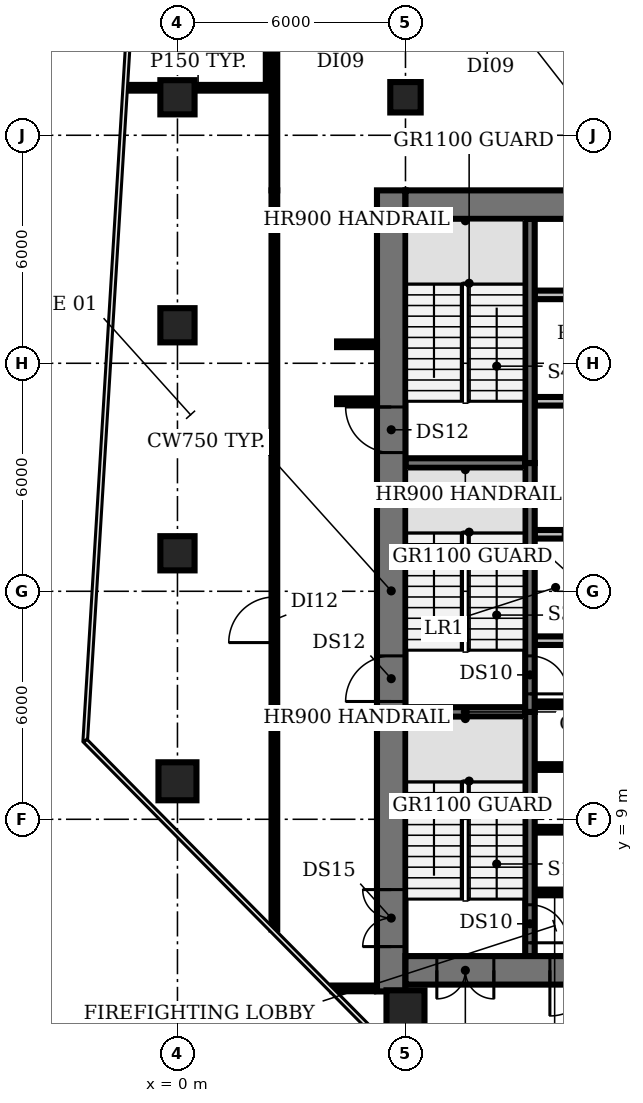
"""IFC4 building model, lengths in metres.
Left out: names, types, materials, properties, quantities, classifications, styles, units other than length and angle.
Written with IfcOpenShell. Run it as: python <this file> out.ifc"""

import sys

from ifc_helpers import new_model, si_unit, direction, frame, frame_2d, origin, origin_2d, place, context, subcontext, project, spatial, rectangle, circle, extrude, element, fill, save


model = new_model("IFC4")
c1 = context("Model", 3, precision=1e-05, world=origin(), true_north=direction((0.0, 1.0)))
c2 = subcontext(c1, "Body", "Model", "MODEL_VIEW")
j1 = project(units=[si_unit("LENGTHUNIT", "METRE"), si_unit("PLANEANGLEUNIT", "RADIAN")], contexts=[c1])
p1 = place(None, origin())
s1 = spatial("IfcSite", under=j1, at=p1, CompositionType="ELEMENT")
p2 = place(p1, origin())
s2 = spatial("IfcBuilding", under=s1, at=p2, CompositionType="ELEMENT")
p3 = place(p2, frame((0.0, 0.0, 125.6)))
s3 = spatial("IfcBuildingStorey", under=s2, at=p3, CompositionType="ELEMENT", Elevation=125.6)
p4 = place(p3, frame((0.0, 10.0, 0.0), z_axis=(0.0, 0.0, 1.0), x_axis=(1.0, 0.0, 0.0)))
e1 = element("IfcColumn", 1, at=p4, inside=s3, PredefinedType="COLUMN", context=c2, shape_type="SweptSolid", body=[
    extrude(circle(Radius=0.5, at=origin_2d()), origin(), (0.0, 0.0, 1.0), 3.85),
])
for number, where, z_axis, x_axis in (
    (2, (0.0, 16.0, 0.0), (0.0, 0.0, 1.0), (1.0, 0.0, 0.0)),
    (3, (0.0, 22.0, 0.0), (0.0, 0.0, 1.0), (1.0, 0.0, 0.0)),
    (4, (0.0, 28.0, 0.0), (0.0, 0.0, 1.0), (1.0, 0.0, 0.0)),
):
    element("IfcColumn", number, at=place(p3, frame(where, z_axis=z_axis, x_axis=x_axis)), inside=s3, PredefinedType="COLUMN", context=c2, shape_type="SweptSolid", body=[
        extrude(rectangle(XDim=0.9, YDim=0.9, at=origin_2d()), origin(), (0.0, 0.0, 1.0), 3.85),
    ])
p5 = place(p3, frame((6.0, 4.0, 0.0), z_axis=(0.0, 0.0, 1.0), x_axis=(1.0, 0.0, 0.0)))
e5 = element("IfcColumn", 5, at=p5, inside=s3, PredefinedType="COLUMN", context=c2, shape_type="SweptSolid", body=[
    extrude(circle(Radius=0.5, at=origin_2d()), origin(), (0.0, 0.0, 1.0), 3.85),
])
p6 = place(p3, frame((6.0, 28.0, 0.0), z_axis=(0.0, 0.0, 1.0), x_axis=(1.0, 0.0, 0.0)))
e6 = element("IfcColumn", 6, at=p6, inside=s3, PredefinedType="COLUMN", context=c2, shape_type="SweptSolid", body=[
    extrude(rectangle(XDim=0.8, YDim=0.8, at=origin_2d()), origin(), (0.0, 0.0, 1.0), 3.85),
])
for number, where, z_axis, x_axis in (
    (7, (9.4, 7.075, 0.0), (0.0, 0.0, 1.0), (1.0, 0.0, 0.0)),
    (8, (9.4, 8.725, 0.0), (0.0, 0.0, 1.0), (1.0, 0.0, 0.0)),
    (9, (9.4, 10.375, 0.0), (0.0, 0.0, 1.0), (1.0, 0.0, 0.0)),
):
    element("IfcWall", number, at=place(p3, frame(where, z_axis=z_axis, x_axis=x_axis)), inside=s3, PredefinedType="SHEAR", context=c2, shape_type="SweptSolid", body=[
        extrude(rectangle(XDim=1.05, YDim=0.15, at=frame_2d((0.525, 0.0))), origin(), (0.0, 0.0, 1.0), 3.85),
    ])
p7 = place(p3, frame((6.0, 11.825, 0.0), z_axis=(0.0, 0.0, 1.0), x_axis=(1.0, 0.0, 0.0)))
e10 = element("IfcWall", 10, at=p7, inside=s3, PredefinedType="SHEAR", context=c2, shape_type="SweptSolid", body=[
    extrude(rectangle(XDim=3.15, YDim=0.25, at=frame_2d((1.575, 0.0))), origin(), (0.0, 0.0, 1.0), 3.85),
])
p8 = place(p3, frame((9.4, 12.025, 0.0), z_axis=(0.0, 0.0, 1.0), x_axis=(1.0, 0.0, 0.0)))
e11 = element("IfcWall", 11, at=p8, inside=s3, PredefinedType="SHEAR", context=c2, shape_type="SweptSolid", body=[
    extrude(rectangle(XDim=1.05, YDim=0.15, at=frame_2d((0.525, 0.0))), origin(), (0.0, 0.0, 1.0), 3.85),
])
p9 = place(p3, frame((9.4, 13.7, 0.0), z_axis=(0.0, 0.0, 1.0), x_axis=(1.0, 0.0, 0.0)))
e12 = element("IfcWall", 12, at=p9, inside=s3, PredefinedType="PARTITIONING", context=c2, shape_type="SweptSolid", body=[
    extrude(rectangle(XDim=4.0, YDim=0.225, at=frame_2d((2.0, 0.0))), origin(), (0.0, 0.0, 1.0), 3.85),
])
p10 = place(p3, frame((9.4, 16.5, 0.0), z_axis=(0.0, 0.0, 1.0), x_axis=(1.0, 0.0, 0.0)))
e13 = element("IfcWall", 13, at=p10, inside=s3, PredefinedType="PARTITIONING", context=c2, shape_type="SweptSolid", body=[
    extrude(rectangle(XDim=14.6, YDim=0.225, at=frame_2d((7.3, 0.0))), origin(), (0.0, 0.0, 1.0), 3.85),
])
p11 = place(p10, frame((0.75, 0.0, 0.0)))
e14 = element("IfcOpeningElement", 14, at=p11, cuts=e13, PredefinedType="OPENING", context=c2, shape_type="SweptSolid", body=[
    extrude(rectangle(XDim=1.1, YDim=2.1, at=frame_2d((0.55, 1.05))), frame((0.0, 0.123, 0.0), z_axis=(0.0, -1.0, 0.0), x_axis=(1.0, 0.0, 0.0)), (0.0, 0.0, 1.0), 0.245),
])
p12 = place(p10, frame((3.55, 0.0, 0.0)))
e15 = element("IfcOpeningElement", 15, at=p12, cuts=e13, PredefinedType="OPENING", context=c2, shape_type="SweptSolid", body=[
    extrude(rectangle(XDim=1.1, YDim=2.1, at=frame_2d((0.55, 1.05))), frame((0.0, 0.123, 0.0), z_axis=(0.0, -1.0, 0.0), x_axis=(1.0, 0.0, 0.0)), (0.0, 0.0, 1.0), 0.245),
])
p13 = place(p10, frame((6.35, 0.0, 0.0)))
e16 = element("IfcOpeningElement", 16, at=p13, cuts=e13, PredefinedType="OPENING", context=c2, shape_type="SweptSolid", body=[
    extrude(rectangle(XDim=1.1, YDim=2.1, at=frame_2d((0.55, 1.05))), frame((0.0, 0.123, 0.0), z_axis=(0.0, -1.0, 0.0), x_axis=(1.0, 0.0, 0.0)), (0.0, 0.0, 1.0), 0.245),
])
p14 = place(p10, frame((9.15, 0.0, 0.0)))
e17 = element("IfcOpeningElement", 17, at=p14, cuts=e13, PredefinedType="OPENING", context=c2, shape_type="SweptSolid", body=[
    extrude(rectangle(XDim=1.1, YDim=2.1, at=frame_2d((0.55, 1.05))), frame((0.0, 0.123, 0.0), z_axis=(0.0, -1.0, 0.0), x_axis=(1.0, 0.0, 0.0)), (0.0, 0.0, 1.0), 0.245),
])
p15 = place(p10, frame((12.4, 0.0, 0.0)))
e18 = element("IfcOpeningElement", 18, at=p15, cuts=e13, PredefinedType="OPENING", context=c2, shape_type="SweptSolid", body=[
    extrude(rectangle(XDim=1.0, YDim=2.1, at=frame_2d((0.5, 1.05))), frame((0.0, 0.123, 0.0), z_axis=(0.0, -1.0, 0.0), x_axis=(1.0, 0.0, 0.0)), (0.0, 0.0, 1.0), 0.245),
])
p16 = place(p3, frame((6.0, 18.375, 0.0), z_axis=(0.0, 0.0, 1.0), x_axis=(1.0, 0.0, 0.0)))
e19 = element("IfcWall", 19, at=p16, inside=s3, PredefinedType="SHEAR", context=c2, shape_type="SweptSolid", body=[
    extrude(rectangle(XDim=3.15, YDim=0.25, at=frame_2d((1.575, 0.0))), origin(), (0.0, 0.0, 1.0), 3.85),
])
p17 = place(p3, frame((24.0, 20.0, 0.0), z_axis=(0.0, 0.0, 1.0), x_axis=(-1.0, 0.0, 0.0)))
e20 = element("IfcWall", 20, at=p17, inside=s3, PredefinedType="PARTITIONING", context=c2, shape_type="SweptSolid", body=[
    extrude(rectangle(XDim=14.6, YDim=0.225, at=frame_2d((7.3, 0.0))), origin(), (0.0, 0.0, 1.0), 3.85),
])
p18 = place(p17, frame((12.5, 0.0, 0.0)))
e21 = element("IfcOpeningElement", 21, at=p18, cuts=e20, PredefinedType="OPENING", context=c2, shape_type="SweptSolid", body=[
    extrude(rectangle(XDim=1.0, YDim=2.1, at=frame_2d((0.5, 1.05))), frame((0.0, 0.123, 0.0), z_axis=(0.0, -1.0, 0.0), x_axis=(1.0, 0.0, 0.0)), (0.0, 0.0, 1.0), 0.245),
])
p19 = place(p17, frame((8.825, 0.0, 0.0)))
e22 = element("IfcOpeningElement", 22, at=p19, cuts=e20, PredefinedType="OPENING", context=c2, shape_type="SweptSolid", body=[
    extrude(rectangle(XDim=1.0, YDim=2.1, at=frame_2d((0.5, 1.05))), frame((0.0, 0.123, 0.0), z_axis=(0.0, -1.0, 0.0), x_axis=(1.0, 0.0, 0.0)), (0.0, 0.0, 1.0), 0.245),
])
p20 = place(p17, frame((4.925, 0.0, 0.0)))
e23 = element("IfcOpeningElement", 23, at=p20, cuts=e20, PredefinedType="OPENING", context=c2, shape_type="SweptSolid", body=[
    extrude(rectangle(XDim=1.0, YDim=2.1, at=frame_2d((0.5, 1.05))), frame((0.0, 0.123, 0.0), z_axis=(0.0, -1.0, 0.0), x_axis=(1.0, 0.0, 0.0)), (0.0, 0.0, 1.0), 0.245),
])
p21 = place(p17, frame((1.2, 0.0, 0.0)))
e24 = element("IfcOpeningElement", 24, at=p21, cuts=e20, PredefinedType="OPENING", context=c2, shape_type="SweptSolid", body=[
    extrude(rectangle(XDim=1.0, YDim=2.1, at=frame_2d((0.5, 1.05))), frame((0.0, 0.123, 0.0), z_axis=(0.0, -1.0, 0.0), x_axis=(1.0, 0.0, 0.0)), (0.0, 0.0, 1.0), 0.245),
])
p22 = place(p3, frame((9.4, 22.8, 0.0), z_axis=(0.0, 0.0, 1.0), x_axis=(1.0, 0.0, 0.0)))
e25 = element("IfcWall", 25, at=p22, inside=s3, PredefinedType="PARTITIONING", context=c2, shape_type="SweptSolid", body=[
    extrude(rectangle(XDim=14.6, YDim=0.225, at=frame_2d((7.3, 0.0))), origin(), (0.0, 0.0, 1.0), 3.85),
])
p23 = place(p3, frame((9.275, 11.825, 0.0), z_axis=(0.0, 0.0, 1.0), x_axis=(0.0, -1.0, 0.0)))
e26 = element("IfcWall", 26, at=p23, inside=s3, PredefinedType="SHEAR", context=c2, shape_type="SweptSolid", body=[
    extrude(rectangle(XDim=6.425, YDim=0.25, at=frame_2d((3.212, 0.0))), origin(), (0.0, 0.0, 1.0), 3.85),
])
p24 = place(p23, frame((5.075, 0.0, 0.0)))
e27 = element("IfcOpeningElement", 27, at=p24, cuts=e26, PredefinedType="OPENING", context=c2, shape_type="SweptSolid", body=[
    extrude(rectangle(XDim=1.0, YDim=2.1, at=frame_2d((0.5, 1.05))), frame((0.0, 0.135, 0.0), z_axis=(0.0, -1.0, 0.0), x_axis=(1.0, 0.0, 0.0)), (0.0, 0.0, 1.0), 0.27),
])
p25 = place(p3, frame((9.275, 18.375, 0.0), z_axis=(0.0, 0.0, 1.0), x_axis=(0.0, -1.0, 0.0)))
e28 = element("IfcWall", 28, at=p25, inside=s3, PredefinedType="SHEAR", context=c2, shape_type="SweptSolid", body=[
    extrude(rectangle(XDim=6.55, YDim=0.25, at=frame_2d((3.275, 0.0))), origin(), (0.0, 0.0, 1.0), 3.85),
])
p26 = place(p25, frame((5.075, 0.0, 0.0)))
e29 = element("IfcOpeningElement", 29, at=p26, cuts=e28, PredefinedType="OPENING", context=c2, shape_type="SweptSolid", body=[
    extrude(rectangle(XDim=1.0, YDim=2.1, at=frame_2d((0.5, 1.05))), frame((0.0, 0.135, 0.0), z_axis=(0.0, -1.0, 0.0), x_axis=(1.0, 0.0, 0.0)), (0.0, 0.0, 1.0), 0.27),
])
p27 = place(p3, frame((9.275, 18.375, 0.0), z_axis=(0.0, 0.0, 1.0), x_axis=(0.0, 1.0, 0.0)))
e30 = element("IfcWall", 30, at=p27, inside=s3, PredefinedType="SHEAR", context=c2, shape_type="SweptSolid", body=[
    extrude(rectangle(XDim=6.425, YDim=0.25, at=frame_2d((3.212, 0.0))), origin(), (0.0, 0.0, 1.0), 3.85),
])
p28 = place(p3, frame((5.625, 4.47, 0.0), z_axis=(0.0, 0.0, 1.0), x_axis=(0.0, 1.0, 0.0)))
e31 = element("IfcWall", 31, at=p28, inside=s3, PredefinedType="SHEAR", context=c2, shape_type="SweptSolid", body=[
    extrude(rectangle(XDim=21.08, YDim=0.75, at=frame_2d((10.54, 0.0))), origin(), (0.0, 0.0, 1.0), 3.85),
])
p29 = place(p28, frame((1.18, 0.0, 0.0)))
e32 = element("IfcOpeningElement", 32, at=p29, cuts=e31, PredefinedType="OPENING", context=c2, shape_type="SweptSolid", body=[
    extrude(rectangle(XDim=1.5, YDim=2.1, at=frame_2d((0.75, 1.05))), frame((0.0, 0.385, 0.0), z_axis=(0.0, -1.0, 0.0), x_axis=(1.0, 0.0, 0.0)), (0.0, 0.0, 1.0), 0.77),
])
p30 = place(p28, frame((7.63, 0.0, 0.0)))
e33 = element("IfcOpeningElement", 33, at=p30, cuts=e31, PredefinedType="OPENING", context=c2, shape_type="SweptSolid", body=[
    extrude(rectangle(XDim=1.2, YDim=2.1, at=frame_2d((0.6, 1.05))), frame((0.0, 0.385, 0.0), z_axis=(0.0, -1.0, 0.0), x_axis=(1.0, 0.0, 0.0)), (0.0, 0.0, 1.0), 0.77),
])
p31 = place(p28, frame((14.18, 0.0, 0.0)))
e34 = element("IfcOpeningElement", 34, at=p31, cuts=e31, PredefinedType="OPENING", context=c2, shape_type="SweptSolid", body=[
    extrude(rectangle(XDim=1.2, YDim=2.1, at=frame_2d((0.6, 1.05))), frame((0.0, 0.385, 0.0), z_axis=(0.0, -1.0, 0.0), x_axis=(1.0, 0.0, 0.0)), (0.0, 0.0, 1.0), 0.77),
])
p32 = place(p3, frame((24.0, 5.025, 0.0), z_axis=(0.0, 0.0, 1.0), x_axis=(-1.0, 0.0, 0.0)))
e35 = element("IfcWall", 35, at=p32, inside=s3, PredefinedType="SHEAR", context=c2, shape_type="SweptSolid", body=[
    extrude(rectangle(XDim=18.0, YDim=0.75, at=frame_2d((9.0, 0.0))), origin(), (0.0, 0.0, 1.0), 3.85),
])
p33 = place(p32, frame((0.825, 0.0, 0.0)))
e36 = element("IfcOpeningElement", 36, at=p33, cuts=e35, PredefinedType="OPENING", context=c2, shape_type="SweptSolid", body=[
    extrude(rectangle(XDim=1.5, YDim=2.1, at=frame_2d((0.75, 1.05))), frame((0.0, 0.385, 0.0), z_axis=(0.0, -1.0, 0.0), x_axis=(1.0, 0.0, 0.0)), (0.0, 0.0, 1.0), 0.77),
])
p34 = place(p32, frame((15.675, 0.0, 0.0)))
e37 = element("IfcOpeningElement", 37, at=p34, cuts=e35, PredefinedType="OPENING", context=c2, shape_type="SweptSolid", body=[
    extrude(rectangle(XDim=1.5, YDim=2.1, at=frame_2d((0.75, 1.05))), frame((0.0, 0.385, 0.0), z_axis=(0.0, -1.0, 0.0), x_axis=(1.0, 0.0, 0.0)), (0.0, 0.0, 1.0), 0.77),
])
p35 = place(p32, frame((13.0, 0.0, 0.0)))
e38 = element("IfcOpeningElement", 38, at=p35, cuts=e35, PredefinedType="OPENING", context=c2, shape_type="SweptSolid", body=[
    extrude(rectangle(XDim=1.2, YDim=2.1, at=frame_2d((0.6, 1.05))), frame((0.0, 0.385, 0.0), z_axis=(0.0, -1.0, 0.0), x_axis=(1.0, 0.0, 0.0)), (0.0, 0.0, 1.0), 0.77),
])
p36 = place(p32, frame((4.35, 0.0, 0.0)))
e39 = element("IfcOpeningElement", 39, at=p36, cuts=e35, PredefinedType="OPENING", context=c2, shape_type="SweptSolid", body=[
    extrude(rectangle(XDim=1.0, YDim=2.1, at=frame_2d((0.5, 1.05))), frame((0.0, 0.385, 0.0), z_axis=(0.0, -1.0, 0.0), x_axis=(1.0, 0.0, 0.0)), (0.0, 0.0, 1.0), 0.77),
])
p37 = place(p3, frame((6.0, 25.175, 0.0), z_axis=(0.0, 0.0, 1.0), x_axis=(1.0, 0.0, 0.0)))
e40 = element("IfcWall", 40, at=p37, inside=s3, PredefinedType="SHEAR", context=c2, shape_type="SweptSolid", body=[
    extrude(rectangle(XDim=18.0, YDim=0.75, at=frame_2d((9.0, 0.0))), origin(), (0.0, 0.0, 1.0), 3.85),
])
p38 = place(p3, frame((-1.314, 28.25, 0.0), z_axis=(0.0, 0.0, 1.0), x_axis=(1.0, 0.0, 0.0)))
e41 = element("IfcWall", 41, at=p38, inside=s3, PredefinedType="PARTITIONING", context=c2, shape_type="SweptSolid", body=[
    extrude(rectangle(XDim=3.714, YDim=0.15, at=frame_2d((1.857, 0.0))), origin(), (0.0, 0.0, 1.0), 2.83),
])
p39 = place(p3, frame((2.4, 28.25, 0.0), z_axis=(0.0, 0.0, 1.0), x_axis=(0.0, 1.0, 0.0)))
e42 = element("IfcWall", 42, at=p39, inside=s3, PredefinedType="PARTITIONING", context=c2, shape_type="SweptSolid", body=[
    extrude(rectangle(XDim=6.0, YDim=0.15, at=frame_2d((3.0, 0.0))), origin(), (0.0, 0.0, 1.0), 2.83),
])
p40 = place(p3, frame((2.55, 6.1, 0.0), z_axis=(0.0, 0.0, 1.0), x_axis=(0.0, 1.0, 0.0)))
e43 = element("IfcWall", 43, at=p40, inside=s3, PredefinedType="PARTITIONING", context=c2, shape_type="SweptSolid", body=[
    extrude(rectangle(XDim=19.45, YDim=0.15, at=frame_2d((9.725, 0.0))), origin(), (0.0, 0.0, 1.0), 2.83),
])
p41 = place(p40, frame((7.55, 0.0, 0.0)))
e44 = element("IfcOpeningElement", 44, at=p41, cuts=e43, PredefinedType="OPENING", context=c2, shape_type="SweptSolid", body=[
    extrude(rectangle(XDim=1.2, YDim=2.1, at=frame_2d((0.6, 1.05))), frame((0.0, 0.085, 0.0), z_axis=(0.0, -1.0, 0.0), x_axis=(1.0, 0.0, 0.0)), (0.0, 0.0, 1.0), 0.17),
])
p42 = place(p3, frame((2.55, 25.55, 0.0), z_axis=(0.0, 0.0, 1.0), x_axis=(0.0, 1.0, 0.0)))
e45 = element("IfcWall", 45, at=p42, inside=s3, PredefinedType="PARTITIONING", context=c2, shape_type="SweptSolid", body=[
    extrude(rectangle(XDim=3.9, YDim=0.15, at=frame_2d((1.95, 0.0))), origin(), (0.0, 0.0, 1.0), 2.83),
])
p43 = place(p3, frame((4.08, 4.55, 0.0), z_axis=(0.0, 0.0, 1.0), x_axis=(1.0, 0.0, 0.0)))
e46 = element("IfcWall", 46, at=p43, inside=s3, PredefinedType="PARTITIONING", context=c2, shape_type="SweptSolid", body=[
    extrude(rectangle(XDim=1.07, YDim=0.15, at=frame_2d((0.535, 0.0))), origin(), (0.0, 0.0, 1.0), 2.83),
])
for number, where, z_axis, x_axis in (
    (47, (4.2, 20.0, 0.0), (0.0, 0.0, 1.0), (1.0, 0.0, 0.0)),
    (48, (4.2, 21.5, 0.0), (0.0, 0.0, 1.0), (1.0, 0.0, 0.0)),
):
    element("IfcWall", number, at=place(p3, frame(where, z_axis=z_axis, x_axis=x_axis)), inside=s3, PredefinedType="PARTITIONING", context=c2, shape_type="SweptSolid", body=[
        extrude(rectangle(XDim=1.05, YDim=0.15, at=frame_2d((0.525, 0.0))), origin(), (0.0, 0.0, 1.0), 2.83),
    ])
p44 = place(p24, origin())
e49 = element("IfcDoor", 49, at=p44, inside=s3, OperationType="SINGLE_SWING_RIGHT", PredefinedType="DOOR", context=c2, shape_type="SweptSolid", body=[
    extrude(rectangle(XDim=1.0, YDim=2.1, at=frame_2d((0.5, 1.05))), frame((0.0, 0.025, 0.0), z_axis=(0.0, -1.0, 0.0), x_axis=(1.0, 0.0, 0.0)), (0.0, 0.0, 1.0), 0.05),
])
fill(e27, e49)
p45 = place(p26, origin())
e50 = element("IfcDoor", 50, at=p45, inside=s3, OperationType="SINGLE_SWING_RIGHT", PredefinedType="DOOR", context=c2, shape_type="SweptSolid", body=[
    extrude(rectangle(XDim=1.0, YDim=2.1, at=frame_2d((0.5, 1.05))), frame((0.0, 0.025, 0.0), z_axis=(0.0, -1.0, 0.0), x_axis=(1.0, 0.0, 0.0)), (0.0, 0.0, 1.0), 0.05),
])
fill(e29, e50)
p46 = place(p29, origin())
e51 = element("IfcDoor", 51, at=p46, inside=s3, OperationType="DOUBLE_DOOR_SINGLE_SWING", PredefinedType="DOOR", context=c2, shape_type="SweptSolid", body=[
    extrude(rectangle(XDim=1.5, YDim=2.1, at=frame_2d((0.75, 1.05))), frame((0.0, 0.025, 0.0), z_axis=(0.0, -1.0, 0.0), x_axis=(1.0, 0.0, 0.0)), (0.0, 0.0, 1.0), 0.05),
])
fill(e32, e51)
p47 = place(p30, origin())
e52 = element("IfcDoor", 52, at=p47, inside=s3, OperationType="SINGLE_SWING_LEFT", PredefinedType="DOOR", context=c2, shape_type="SweptSolid", body=[
    extrude(rectangle(XDim=1.2, YDim=2.1, at=frame_2d((0.6, 1.05))), frame((0.0, 0.025, 0.0), z_axis=(0.0, -1.0, 0.0), x_axis=(1.0, 0.0, 0.0)), (0.0, 0.0, 1.0), 0.05),
])
fill(e33, e52)
p48 = place(p31, origin())
e53 = element("IfcDoor", 53, at=p48, inside=s3, OperationType="SINGLE_SWING_RIGHT", PredefinedType="DOOR", context=c2, shape_type="SweptSolid", body=[
    extrude(rectangle(XDim=1.2, YDim=2.1, at=frame_2d((0.6, 1.05))), frame((0.0, 0.025, 0.0), z_axis=(0.0, -1.0, 0.0), x_axis=(1.0, 0.0, 0.0)), (0.0, 0.0, 1.0), 0.05),
])
fill(e34, e53)
p49 = place(p34, origin())
e54 = element("IfcDoor", 54, at=p49, inside=s3, OperationType="DOUBLE_DOOR_SINGLE_SWING", PredefinedType="DOOR", context=c2, shape_type="SweptSolid", body=[
    extrude(rectangle(XDim=1.5, YDim=2.1, at=frame_2d((0.75, 1.05))), frame((0.0, 0.025, 0.0), z_axis=(0.0, -1.0, 0.0), x_axis=(1.0, 0.0, 0.0)), (0.0, 0.0, 1.0), 0.05),
])
fill(e37, e54)
p50 = place(p35, origin())
e55 = element("IfcDoor", 55, at=p50, inside=s3, OperationType="SINGLE_SWING_RIGHT", PredefinedType="DOOR", context=c2, shape_type="SweptSolid", body=[
    extrude(rectangle(XDim=1.2, YDim=2.1, at=frame_2d((0.6, 1.05))), frame((0.0, 0.025, 0.0), z_axis=(0.0, -1.0, 0.0), x_axis=(1.0, 0.0, 0.0)), (0.0, 0.0, 1.0), 0.05),
])
fill(e38, e55)
p51 = place(p41, origin())
e56 = element("IfcDoor", 56, at=p51, inside=s3, OperationType="SINGLE_SWING_LEFT", PredefinedType="DOOR", context=c2, shape_type="SweptSolid", body=[
    extrude(rectangle(XDim=1.2, YDim=2.1, at=frame_2d((0.6, 1.05))), frame((0.0, 0.025, 0.0), z_axis=(0.0, -1.0, 0.0), x_axis=(1.0, 0.0, 0.0)), (0.0, 0.0, 1.0), 0.05),
])
fill(e44, e56)
save(model, sys.argv[1])
